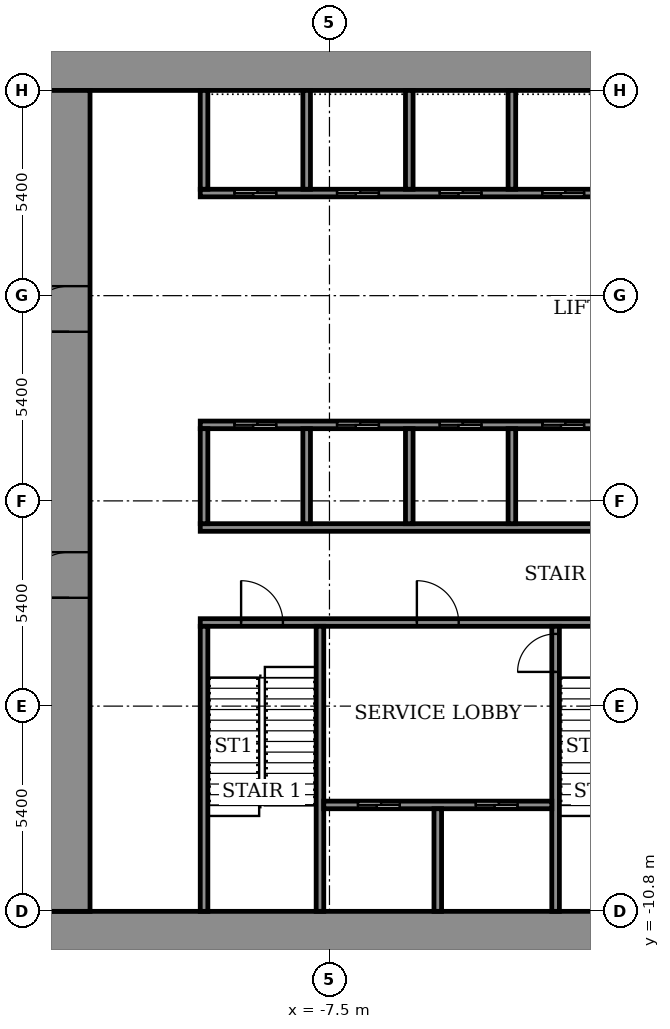
"""IFC4 building model, lengths in metres.
Left out: names, types, materials, properties, quantities, classifications, styles, units other than length and angle.
Written with IfcOpenShell. Run it as: python <this file> out.ifc"""

import sys

from ifc_helpers import new_model, si_unit, direction, frame, frame_2d, origin, place, context, subcontext, project, spatial, rectangle, extrude, element, fill, save


model = new_model("IFC4")
c1 = context("Model", 3, precision=1e-05, world=origin(), true_north=direction((0.0, 1.0)))
c2 = subcontext(c1, "Body", "Model", "MODEL_VIEW")
j1 = project(units=[si_unit("LENGTHUNIT", "METRE"), si_unit("PLANEANGLEUNIT", "RADIAN")], contexts=[c1])
p1 = place(None, origin())
s1 = spatial("IfcSite", under=j1, at=p1, CompositionType="ELEMENT")
p2 = place(p1, origin())
s2 = spatial("IfcBuilding", under=s1, at=p2, CompositionType="ELEMENT")
p3 = place(p2, frame((0.0, 0.0, 74.7)))
s3 = spatial("IfcBuildingStorey", under=s2, at=p3, CompositionType="ELEMENT", Elevation=74.7)
for number, where, z_axis, x_axis in (
    (1, (-14.9, -11.35, 0.0), (0.0, 0.0, 1.0), (1.0, 0.0, 0.0)),
    (2, (-14.9, 11.35, 0.0), (0.0, 0.0, 1.0), (1.0, 0.0, 0.0)),
):
    element("IfcWall", number, at=place(p3, frame(where, z_axis=z_axis, x_axis=x_axis)), inside=s3, PredefinedType="SHEAR", context=c2, shape_type="SweptSolid", body=[
        extrude(rectangle(XDim=29.8, YDim=1.1, at=frame_2d((14.9, 0.0))), origin(), (0.0, 0.0, 1.0), 4.6),
    ])
p4 = place(p3, frame((-14.35, -10.8, 0.0), z_axis=(0.0, 0.0, 1.0), x_axis=(0.0, 1.0, 0.0)))
e3 = element("IfcWall", 3, at=p4, inside=s3, PredefinedType="SHEAR", context=c2, shape_type="SweptSolid", body=[
    extrude(rectangle(XDim=21.6, YDim=1.1, at=frame_2d((10.8, 0.0))), origin(), (0.0, 0.0, 1.0), 4.6),
])
p5 = place(p4, frame((8.25, 0.0, 0.0)))
e4 = element("IfcOpeningElement", 4, at=p5, cuts=e3, PredefinedType="OPENING", context=c2, shape_type="SweptSolid", body=[
    extrude(rectangle(XDim=1.2, YDim=2.1, at=frame_2d((0.6, 1.05))), frame((0.0, 0.56, 0.0), z_axis=(0.0, -1.0, 0.0), x_axis=(1.0, 0.0, 0.0)), (0.0, 0.0, 1.0), 1.12),
])
p6 = place(p4, frame((15.25, 0.0, 0.0)))
e5 = element("IfcOpeningElement", 5, at=p6, cuts=e3, PredefinedType="OPENING", context=c2, shape_type="SweptSolid", body=[
    extrude(rectangle(XDim=1.2, YDim=2.1, at=frame_2d((0.6, 1.05))), frame((0.0, 0.56, 0.0), z_axis=(0.0, -1.0, 0.0), x_axis=(1.0, 0.0, 0.0)), (0.0, 0.0, 1.0), 1.12),
])
p7 = place(p3, frame((-10.9, -3.2, 0.0), z_axis=(0.0, 0.0, 1.0), x_axis=(1.0, 0.0, 0.0)))
e6 = element("IfcWall", 6, at=p7, inside=s3, PredefinedType="SHEAR", context=c2, shape_type="SweptSolid", body=[
    extrude(rectangle(XDim=21.8, YDim=0.2, at=frame_2d((10.9, 0.0))), origin(), (0.0, 0.0, 1.0), 4.05),
])
p8 = place(p7, frame((1.075, 0.0, 0.0)))
e7 = element("IfcOpeningElement", 7, at=p8, cuts=e6, PredefinedType="OPENING", context=c2, shape_type="SweptSolid", body=[
    extrude(rectangle(XDim=1.1, YDim=2.1, at=frame_2d((0.55, 1.05))), frame((0.0, 0.11, 0.0), z_axis=(0.0, -1.0, 0.0), x_axis=(1.0, 0.0, 0.0)), (0.0, 0.0, 1.0), 0.22),
])
p9 = place(p7, frame((10.325, 0.0, 0.0)))
e8 = element("IfcOpeningElement", 8, at=p9, cuts=e6, PredefinedType="OPENING", context=c2, shape_type="SweptSolid", body=[
    extrude(rectangle(XDim=1.1, YDim=2.1, at=frame_2d((0.55, 1.05))), frame((0.0, 0.11, 0.0), z_axis=(0.0, -1.0, 0.0), x_axis=(1.0, 0.0, 0.0)), (0.0, 0.0, 1.0), 0.22),
])
p10 = place(p7, frame((19.625, 0.0, 0.0)))
e9 = element("IfcOpeningElement", 9, at=p10, cuts=e6, PredefinedType="OPENING", context=c2, shape_type="SweptSolid", body=[
    extrude(rectangle(XDim=1.1, YDim=2.1, at=frame_2d((0.55, 1.05))), frame((0.0, 0.11, 0.0), z_axis=(0.0, -1.0, 0.0), x_axis=(1.0, 0.0, 0.0)), (0.0, 0.0, 1.0), 0.22),
])
p11 = place(p7, frame((5.7, 0.0, 0.0)))
e10 = element("IfcOpeningElement", 10, at=p11, cuts=e6, PredefinedType="OPENING", context=c2, shape_type="SweptSolid", body=[
    extrude(rectangle(XDim=1.1, YDim=2.1, at=frame_2d((0.55, 1.05))), frame((0.0, 0.11, 0.0), z_axis=(0.0, -1.0, 0.0), x_axis=(1.0, 0.0, 0.0)), (0.0, 0.0, 1.0), 0.22),
])
p12 = place(p7, frame((14.975, 0.0, 0.0)))
e11 = element("IfcOpeningElement", 11, at=p12, cuts=e6, PredefinedType="OPENING", context=c2, shape_type="SweptSolid", body=[
    extrude(rectangle(XDim=1.1, YDim=2.1, at=frame_2d((0.55, 1.05))), frame((0.0, 0.11, 0.0), z_axis=(0.0, -1.0, 0.0), x_axis=(1.0, 0.0, 0.0)), (0.0, 0.0, 1.0), 0.22),
])
p13 = place(p3, frame((-10.9, -0.7, 0.0), z_axis=(0.0, 0.0, 1.0), x_axis=(1.0, 0.0, 0.0)))
e12 = element("IfcWall", 12, at=p13, inside=s3, PredefinedType="SHEAR", context=c2, shape_type="SweptSolid", body=[
    extrude(rectangle(XDim=21.8, YDim=0.2, at=frame_2d((10.9, 0.0))), origin(), (0.0, 0.0, 1.0), 4.05),
])
p14 = place(p3, frame((-10.9, 2.0, 0.0), z_axis=(0.0, 0.0, 1.0), x_axis=(1.0, 0.0, 0.0)))
e13 = element("IfcWall", 13, at=p14, inside=s3, PredefinedType="SHEAR", context=c2, shape_type="SweptSolid", body=[
    extrude(rectangle(XDim=21.8, YDim=0.2, at=frame_2d((10.9, 0.0))), origin(), (0.0, 0.0, 1.0), 4.05),
])
p15 = place(p14, frame((0.9, 0.0, 0.0)))
e14 = element("IfcOpeningElement", 14, at=p15, cuts=e13, PredefinedType="OPENING", context=c2, shape_type="SweptSolid", body=[
    extrude(rectangle(XDim=1.1, YDim=2.1, at=frame_2d((0.55, 1.05))), frame((0.0, 0.11, 0.0), z_axis=(0.0, -1.0, 0.0), x_axis=(1.0, 0.0, 0.0)), (0.0, 0.0, 1.0), 0.22),
])
p16 = place(p14, frame((3.6, 0.0, 0.0)))
e15 = element("IfcOpeningElement", 15, at=p16, cuts=e13, PredefinedType="OPENING", context=c2, shape_type="SweptSolid", body=[
    extrude(rectangle(XDim=1.1, YDim=2.1, at=frame_2d((0.55, 1.05))), frame((0.0, 0.11, 0.0), z_axis=(0.0, -1.0, 0.0), x_axis=(1.0, 0.0, 0.0)), (0.0, 0.0, 1.0), 0.22),
])
p17 = place(p14, frame((6.3, 0.0, 0.0)))
e16 = element("IfcOpeningElement", 16, at=p17, cuts=e13, PredefinedType="OPENING", context=c2, shape_type="SweptSolid", body=[
    extrude(rectangle(XDim=1.1, YDim=2.1, at=frame_2d((0.55, 1.05))), frame((0.0, 0.11, 0.0), z_axis=(0.0, -1.0, 0.0), x_axis=(1.0, 0.0, 0.0)), (0.0, 0.0, 1.0), 0.22),
])
p18 = place(p14, frame((9.0, 0.0, 0.0)))
e17 = element("IfcOpeningElement", 17, at=p18, cuts=e13, PredefinedType="OPENING", context=c2, shape_type="SweptSolid", body=[
    extrude(rectangle(XDim=1.1, YDim=2.1, at=frame_2d((0.55, 1.05))), frame((0.0, 0.11, 0.0), z_axis=(0.0, -1.0, 0.0), x_axis=(1.0, 0.0, 0.0)), (0.0, 0.0, 1.0), 0.22),
])
p19 = place(p14, frame((11.7, 0.0, 0.0)))
e18 = element("IfcOpeningElement", 18, at=p19, cuts=e13, PredefinedType="OPENING", context=c2, shape_type="SweptSolid", body=[
    extrude(rectangle(XDim=1.1, YDim=2.1, at=frame_2d((0.55, 1.05))), frame((0.0, 0.11, 0.0), z_axis=(0.0, -1.0, 0.0), x_axis=(1.0, 0.0, 0.0)), (0.0, 0.0, 1.0), 0.22),
])
p20 = place(p14, frame((17.2, 0.0, 0.0)))
e19 = element("IfcOpeningElement", 19, at=p20, cuts=e13, PredefinedType="OPENING", context=c2, shape_type="SweptSolid", body=[
    extrude(rectangle(XDim=0.9, YDim=2.1, at=frame_2d((0.45, 1.05))), frame((0.0, 0.11, 0.0), z_axis=(0.0, -1.0, 0.0), x_axis=(1.0, 0.0, 0.0)), (0.0, 0.0, 1.0), 0.22),
])
p21 = place(p3, frame((-10.9, 8.1, 0.0), z_axis=(0.0, 0.0, 1.0), x_axis=(1.0, 0.0, 0.0)))
e20 = element("IfcWall", 20, at=p21, inside=s3, PredefinedType="SHEAR", context=c2, shape_type="SweptSolid", body=[
    extrude(rectangle(XDim=21.8, YDim=0.2, at=frame_2d((10.9, 0.0))), origin(), (0.0, 0.0, 1.0), 4.05),
])
p22 = place(p21, frame((0.9, 0.0, 0.0)))
e21 = element("IfcOpeningElement", 21, at=p22, cuts=e20, PredefinedType="OPENING", context=c2, shape_type="SweptSolid", body=[
    extrude(rectangle(XDim=1.1, YDim=2.1, at=frame_2d((0.55, 1.05))), frame((0.0, 0.11, 0.0), z_axis=(0.0, -1.0, 0.0), x_axis=(1.0, 0.0, 0.0)), (0.0, 0.0, 1.0), 0.22),
])
p23 = place(p21, frame((3.6, 0.0, 0.0)))
e22 = element("IfcOpeningElement", 22, at=p23, cuts=e20, PredefinedType="OPENING", context=c2, shape_type="SweptSolid", body=[
    extrude(rectangle(XDim=1.1, YDim=2.1, at=frame_2d((0.55, 1.05))), frame((0.0, 0.11, 0.0), z_axis=(0.0, -1.0, 0.0), x_axis=(1.0, 0.0, 0.0)), (0.0, 0.0, 1.0), 0.22),
])
p24 = place(p21, frame((6.3, 0.0, 0.0)))
e23 = element("IfcOpeningElement", 23, at=p24, cuts=e20, PredefinedType="OPENING", context=c2, shape_type="SweptSolid", body=[
    extrude(rectangle(XDim=1.1, YDim=2.1, at=frame_2d((0.55, 1.05))), frame((0.0, 0.11, 0.0), z_axis=(0.0, -1.0, 0.0), x_axis=(1.0, 0.0, 0.0)), (0.0, 0.0, 1.0), 0.22),
])
p25 = place(p21, frame((9.0, 0.0, 0.0)))
e24 = element("IfcOpeningElement", 24, at=p25, cuts=e20, PredefinedType="OPENING", context=c2, shape_type="SweptSolid", body=[
    extrude(rectangle(XDim=1.1, YDim=2.1, at=frame_2d((0.55, 1.05))), frame((0.0, 0.11, 0.0), z_axis=(0.0, -1.0, 0.0), x_axis=(1.0, 0.0, 0.0)), (0.0, 0.0, 1.0), 0.22),
])
p26 = place(p21, frame((11.7, 0.0, 0.0)))
e25 = element("IfcOpeningElement", 25, at=p26, cuts=e20, PredefinedType="OPENING", context=c2, shape_type="SweptSolid", body=[
    extrude(rectangle(XDim=1.1, YDim=2.1, at=frame_2d((0.55, 1.05))), frame((0.0, 0.11, 0.0), z_axis=(0.0, -1.0, 0.0), x_axis=(1.0, 0.0, 0.0)), (0.0, 0.0, 1.0), 0.22),
])
p27 = place(p21, frame((14.5, 0.0, 0.0)))
e26 = element("IfcOpeningElement", 26, at=p27, cuts=e20, PredefinedType="OPENING", context=c2, shape_type="SweptSolid", body=[
    extrude(rectangle(XDim=0.9, YDim=2.1, at=frame_2d((0.45, 1.05))), frame((0.0, 0.11, 0.0), z_axis=(0.0, -1.0, 0.0), x_axis=(1.0, 0.0, 0.0)), (0.0, 0.0, 1.0), 0.22),
])
p28 = place(p21, frame((18.55, 0.0, 0.0)))
e27 = element("IfcOpeningElement", 27, at=p28, cuts=e20, PredefinedType="OPENING", context=c2, shape_type="SweptSolid", body=[
    extrude(rectangle(XDim=0.9, YDim=2.1, at=frame_2d((0.45, 1.05))), frame((0.0, 0.11, 0.0), z_axis=(0.0, -1.0, 0.0), x_axis=(1.0, 0.0, 0.0)), (0.0, 0.0, 1.0), 0.22),
])
for number, where, z_axis, x_axis in (
    (28, (-10.8, -10.8, 0.0), (0.0, 0.0, 1.0), (0.0, 1.0, 0.0)),
    (29, (-7.75, -10.8, 0.0), (0.0, 0.0, 1.0), (0.0, 1.0, 0.0)),
):
    element("IfcWall", number, at=place(p3, frame(where, z_axis=z_axis, x_axis=x_axis)), inside=s3, PredefinedType="SHEAR", context=c2, shape_type="SweptSolid", body=[
        extrude(rectangle(XDim=7.5, YDim=0.2, at=frame_2d((3.75, 0.0))), origin(), (0.0, 0.0, 1.0), 4.05),
    ])
p29 = place(p3, frame((-1.55, -10.8, 0.0), z_axis=(0.0, 0.0, 1.0), x_axis=(0.0, 1.0, 0.0)))
e30 = element("IfcWall", 30, at=p29, inside=s3, PredefinedType="SHEAR", context=c2, shape_type="SweptSolid", body=[
    extrude(rectangle(XDim=7.5, YDim=0.2, at=frame_2d((3.75, 0.0))), origin(), (0.0, 0.0, 1.0), 4.05),
])
p30 = place(p29, frame((6.3, 0.0, 0.0)))
e31 = element("IfcOpeningElement", 31, at=p30, cuts=e30, PredefinedType="OPENING", context=c2, shape_type="SweptSolid", body=[
    extrude(rectangle(XDim=1.0, YDim=2.1, at=frame_2d((0.5, 1.05))), frame((0.0, 0.11, 0.0), z_axis=(0.0, -1.0, 0.0), x_axis=(1.0, 0.0, 0.0)), (0.0, 0.0, 1.0), 0.22),
])
p31 = place(p3, frame((-7.65, -8.0, 0.0), z_axis=(0.0, 0.0, 1.0), x_axis=(1.0, 0.0, 0.0)))
e32 = element("IfcWall", 32, at=p31, inside=s3, PredefinedType="SHEAR", context=c2, shape_type="SweptSolid", body=[
    extrude(rectangle(XDim=6.0, YDim=0.2, at=frame_2d((3.0, 0.0))), origin(), (0.0, 0.0, 1.0), 4.05),
])
p32 = place(p31, frame((0.9, 0.0, 0.0)))
e33 = element("IfcOpeningElement", 33, at=p32, cuts=e32, PredefinedType="OPENING", context=c2, shape_type="SweptSolid", body=[
    extrude(rectangle(XDim=1.1, YDim=2.1, at=frame_2d((0.55, 1.05))), frame((0.0, 0.11, 0.0), z_axis=(0.0, -1.0, 0.0), x_axis=(1.0, 0.0, 0.0)), (0.0, 0.0, 1.0), 0.22),
])
p33 = place(p31, frame((4.0, 0.0, 0.0)))
e34 = element("IfcOpeningElement", 34, at=p33, cuts=e32, PredefinedType="OPENING", context=c2, shape_type="SweptSolid", body=[
    extrude(rectangle(XDim=1.1, YDim=2.1, at=frame_2d((0.55, 1.05))), frame((0.0, 0.11, 0.0), z_axis=(0.0, -1.0, 0.0), x_axis=(1.0, 0.0, 0.0)), (0.0, 0.0, 1.0), 0.22),
])
p34 = place(p3, frame((-4.65, -10.8, 0.0), z_axis=(0.0, 0.0, 1.0), x_axis=(0.0, 1.0, 0.0)))
e35 = element("IfcWall", 35, at=p34, inside=s3, PredefinedType="SHEAR", context=c2, shape_type="SweptSolid", body=[
    extrude(rectangle(XDim=2.7, YDim=0.2, at=frame_2d((1.35, 0.0))), origin(), (0.0, 0.0, 1.0), 4.05),
])
for number, where, z_axis, x_axis in (
    (36, (-10.8, -0.6, 0.0), (0.0, 0.0, 1.0), (0.0, 1.0, 0.0)),
    (37, (-8.1, -0.6, 0.0), (0.0, 0.0, 1.0), (0.0, 1.0, 0.0)),
    (38, (-5.4, -0.6, 0.0), (0.0, 0.0, 1.0), (0.0, 1.0, 0.0)),
    (39, (-2.7, -0.6, 0.0), (0.0, 0.0, 1.0), (0.0, 1.0, 0.0)),
):
    element("IfcWall", number, at=place(p3, frame(where, z_axis=z_axis, x_axis=x_axis)), inside=s3, PredefinedType="SHEAR", context=c2, shape_type="SweptSolid", body=[
        extrude(rectangle(XDim=2.5, YDim=0.2, at=frame_2d((1.25, 0.0))), origin(), (0.0, 0.0, 1.0), 4.05),
    ])
for number, where, z_axis, x_axis in (
    (40, (-10.8, 8.2, 0.0), (0.0, 0.0, 1.0), (0.0, 1.0, 0.0)),
    (41, (-8.1, 8.2, 0.0), (0.0, 0.0, 1.0), (0.0, 1.0, 0.0)),
    (42, (-5.4, 8.2, 0.0), (0.0, 0.0, 1.0), (0.0, 1.0, 0.0)),
    (43, (-2.7, 8.2, 0.0), (0.0, 0.0, 1.0), (0.0, 1.0, 0.0)),
):
    element("IfcWall", number, at=place(p3, frame(where, z_axis=z_axis, x_axis=x_axis)), inside=s3, PredefinedType="SHEAR", context=c2, shape_type="SweptSolid", body=[
        extrude(rectangle(XDim=2.6, YDim=0.2, at=frame_2d((1.3, 0.0))), origin(), (0.0, 0.0, 1.0), 4.05),
    ])
p35 = place(p5, origin())
e44 = element("IfcDoor", 44, at=p35, inside=s3, OperationType="DOUBLE_DOOR_SINGLE_SWING", PredefinedType="DOOR", context=c2, shape_type="SweptSolid", body=[
    extrude(rectangle(XDim=1.2, YDim=2.1, at=frame_2d((0.6, 1.05))), frame((0.0, 0.025, 0.0), z_axis=(0.0, -1.0, 0.0), x_axis=(1.0, 0.0, 0.0)), (0.0, 0.0, 1.0), 0.05),
])
fill(e4, e44)
p36 = place(p6, origin())
e45 = element("IfcDoor", 45, at=p36, inside=s3, OperationType="DOUBLE_DOOR_SINGLE_SWING", PredefinedType="DOOR", context=c2, shape_type="SweptSolid", body=[
    extrude(rectangle(XDim=1.2, YDim=2.1, at=frame_2d((0.6, 1.05))), frame((0.0, 0.025, 0.0), z_axis=(0.0, -1.0, 0.0), x_axis=(1.0, 0.0, 0.0)), (0.0, 0.0, 1.0), 0.05),
])
fill(e5, e45)
p37 = place(p15, origin())
e46 = element("IfcDoor", 46, at=p37, inside=s3, OperationType="SLIDING_TO_LEFT", PredefinedType="DOOR", context=c2, shape_type="SweptSolid", body=[
    extrude(rectangle(XDim=1.1, YDim=2.1, at=frame_2d((0.55, 1.05))), frame((0.0, 0.025, 0.0), z_axis=(0.0, -1.0, 0.0), x_axis=(1.0, 0.0, 0.0)), (0.0, 0.0, 1.0), 0.05),
])
fill(e14, e46)
p38 = place(p16, origin())
e47 = element("IfcDoor", 47, at=p38, inside=s3, OperationType="SLIDING_TO_LEFT", PredefinedType="DOOR", context=c2, shape_type="SweptSolid", body=[
    extrude(rectangle(XDim=1.1, YDim=2.1, at=frame_2d((0.55, 1.05))), frame((0.0, 0.025, 0.0), z_axis=(0.0, -1.0, 0.0), x_axis=(1.0, 0.0, 0.0)), (0.0, 0.0, 1.0), 0.05),
])
fill(e15, e47)
p39 = place(p17, origin())
e48 = element("IfcDoor", 48, at=p39, inside=s3, OperationType="SLIDING_TO_LEFT", PredefinedType="DOOR", context=c2, shape_type="SweptSolid", body=[
    extrude(rectangle(XDim=1.1, YDim=2.1, at=frame_2d((0.55, 1.05))), frame((0.0, 0.025, 0.0), z_axis=(0.0, -1.0, 0.0), x_axis=(1.0, 0.0, 0.0)), (0.0, 0.0, 1.0), 0.05),
])
fill(e16, e48)
p40 = place(p18, origin())
e49 = element("IfcDoor", 49, at=p40, inside=s3, OperationType="SLIDING_TO_LEFT", PredefinedType="DOOR", context=c2, shape_type="SweptSolid", body=[
    extrude(rectangle(XDim=1.1, YDim=2.1, at=frame_2d((0.55, 1.05))), frame((0.0, 0.025, 0.0), z_axis=(0.0, -1.0, 0.0), x_axis=(1.0, 0.0, 0.0)), (0.0, 0.0, 1.0), 0.05),
])
fill(e17, e49)
p41 = place(p22, origin())
e50 = element("IfcDoor", 50, at=p41, inside=s3, OperationType="SLIDING_TO_LEFT", PredefinedType="DOOR", context=c2, shape_type="SweptSolid", body=[
    extrude(rectangle(XDim=1.1, YDim=2.1, at=frame_2d((0.55, 1.05))), frame((0.0, 0.025, 0.0), z_axis=(0.0, -1.0, 0.0), x_axis=(1.0, 0.0, 0.0)), (0.0, 0.0, 1.0), 0.05),
])
fill(e21, e50)
p42 = place(p23, origin())
e51 = element("IfcDoor", 51, at=p42, inside=s3, OperationType="SLIDING_TO_LEFT", PredefinedType="DOOR", context=c2, shape_type="SweptSolid", body=[
    extrude(rectangle(XDim=1.1, YDim=2.1, at=frame_2d((0.55, 1.05))), frame((0.0, 0.025, 0.0), z_axis=(0.0, -1.0, 0.0), x_axis=(1.0, 0.0, 0.0)), (0.0, 0.0, 1.0), 0.05),
])
fill(e22, e51)
p43 = place(p24, origin())
e52 = element("IfcDoor", 52, at=p43, inside=s3, OperationType="SLIDING_TO_LEFT", PredefinedType="DOOR", context=c2, shape_type="SweptSolid", body=[
    extrude(rectangle(XDim=1.1, YDim=2.1, at=frame_2d((0.55, 1.05))), frame((0.0, 0.025, 0.0), z_axis=(0.0, -1.0, 0.0), x_axis=(1.0, 0.0, 0.0)), (0.0, 0.0, 1.0), 0.05),
])
fill(e23, e52)
p44 = place(p25, origin())
e53 = element("IfcDoor", 53, at=p44, inside=s3, OperationType="SLIDING_TO_LEFT", PredefinedType="DOOR", context=c2, shape_type="SweptSolid", body=[
    extrude(rectangle(XDim=1.1, YDim=2.1, at=frame_2d((0.55, 1.05))), frame((0.0, 0.025, 0.0), z_axis=(0.0, -1.0, 0.0), x_axis=(1.0, 0.0, 0.0)), (0.0, 0.0, 1.0), 0.05),
])
fill(e24, e53)
p45 = place(p32, origin())
e54 = element("IfcDoor", 54, at=p45, inside=s3, OperationType="SLIDING_TO_LEFT", PredefinedType="DOOR", context=c2, shape_type="SweptSolid", body=[
    extrude(rectangle(XDim=1.1, YDim=2.1, at=frame_2d((0.55, 1.05))), frame((0.0, 0.025, 0.0), z_axis=(0.0, -1.0, 0.0), x_axis=(1.0, 0.0, 0.0)), (0.0, 0.0, 1.0), 0.05),
])
fill(e33, e54)
p46 = place(p33, origin())
e55 = element("IfcDoor", 55, at=p46, inside=s3, OperationType="SLIDING_TO_LEFT", PredefinedType="DOOR", context=c2, shape_type="SweptSolid", body=[
    extrude(rectangle(XDim=1.1, YDim=2.1, at=frame_2d((0.55, 1.05))), frame((0.0, 0.025, 0.0), z_axis=(0.0, -1.0, 0.0), x_axis=(1.0, 0.0, 0.0)), (0.0, 0.0, 1.0), 0.05),
])
fill(e34, e55)
p47 = place(p8, origin())
e56 = element("IfcDoor", 56, at=p47, inside=s3, OperationType="SINGLE_SWING_RIGHT", PredefinedType="DOOR", context=c2, shape_type="SweptSolid", body=[
    extrude(rectangle(XDim=1.1, YDim=2.1, at=frame_2d((0.55, 1.05))), frame((0.0, 0.025, 0.0), z_axis=(0.0, -1.0, 0.0), x_axis=(1.0, 0.0, 0.0)), (0.0, 0.0, 1.0), 0.05),
])
fill(e7, e56)
p48 = place(p11, origin())
e57 = element("IfcDoor", 57, at=p48, inside=s3, OperationType="SINGLE_SWING_LEFT", PredefinedType="DOOR", context=c2, shape_type="SweptSolid", body=[
    extrude(rectangle(XDim=1.1, YDim=2.1, at=frame_2d((0.55, 1.05))), frame((0.0, 0.025, 0.0), z_axis=(0.0, -1.0, 0.0), x_axis=(1.0, 0.0, 0.0)), (0.0, 0.0, 1.0), 0.05),
])
fill(e10, e57)
p49 = place(p30, origin())
e58 = element("IfcDoor", 58, at=p49, inside=s3, OperationType="SINGLE_SWING_RIGHT", PredefinedType="DOOR", context=c2, shape_type="SweptSolid", body=[
    extrude(rectangle(XDim=1.0, YDim=2.1, at=frame_2d((0.5, 1.05))), frame((0.0, 0.025, 0.0), z_axis=(0.0, -1.0, 0.0), x_axis=(1.0, 0.0, 0.0)), (0.0, 0.0, 1.0), 0.05),
])
fill(e31, e58)
save(model, sys.argv[1])
